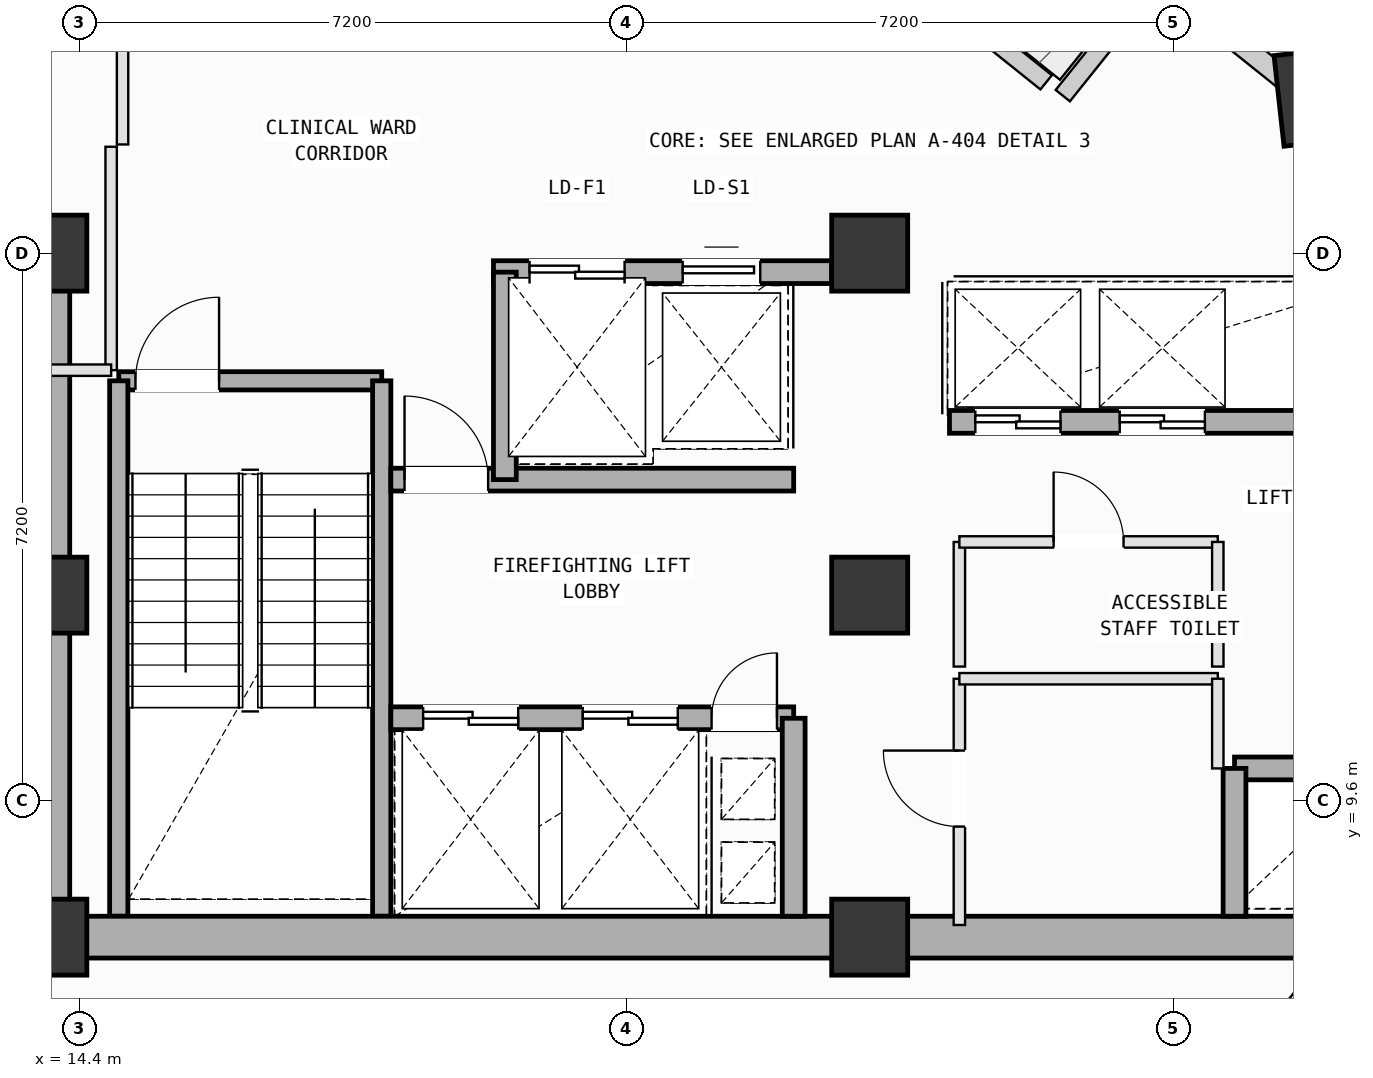
"""IFC4 building model, lengths in metres.
Left out: names, types, materials, properties, quantities, classifications, styles, units other than length and angle.
Written with IfcOpenShell. Run it as: python <this file> out.ifc"""

import sys

from ifc_helpers import new_model, si_unit, direction, frame, frame_2d, origin, origin_2d, place, context, subcontext, project, spatial, rectangle, extrude, element, fill, save


model = new_model("IFC4")
c1 = context("Model", 3, precision=1e-05, world=origin(), true_north=direction((0.0, 1.0)))
c2 = subcontext(c1, "Body", "Model", "MODEL_VIEW")
j1 = project(units=[si_unit("LENGTHUNIT", "METRE"), si_unit("PLANEANGLEUNIT", "RADIAN")], contexts=[c1])
p1 = place(None, origin())
s1 = spatial("IfcSite", under=j1, at=p1, CompositionType="ELEMENT")
p2 = place(p1, origin())
s2 = spatial("IfcBuilding", under=s1, at=p2, CompositionType="ELEMENT")
p3 = place(p2, frame((0.0, 0.0, 243.2)))
s3 = spatial("IfcBuildingStorey", under=s2, at=p3, CompositionType="ELEMENT", Elevation=243.2)
for number, where, z_axis, x_axis in (
    (1, (14.0, 7.8, 0.0), (0.0, 0.0, 1.0), (1.0, 0.0, 0.0)),
    (2, (14.0, 12.3, 0.0), (0.0, 0.0, 1.0), (1.0, 0.0, 0.0)),
    (3, (14.0, 16.8, 0.0), (0.0, 0.0, 1.0), (1.0, 0.0, 0.0)),
    (4, (24.8, 7.8, 0.0), (0.0, 0.0, 1.0), (1.0, 0.0, 0.0)),
    (5, (24.8, 12.3, 0.0), (0.0, 0.0, 1.0), (1.0, 0.0, 0.0)),
    (6, (24.8, 16.8, 0.0), (0.0, 0.0, 1.0), (1.0, 0.0, 0.0)),
):
    element("IfcColumn", number, at=place(p3, frame(where, z_axis=z_axis, x_axis=x_axis)), inside=s3, PredefinedType="COLUMN", context=c2, shape_type="SweptSolid", body=[
        extrude(rectangle(XDim=1.0, YDim=1.0, at=origin_2d()), origin(), (0.0, 0.0, 1.0), 4.0),
    ])
p4 = place(p3, frame((30.558, 18.844, 0.002), z_axis=(0.024793450183, -0.012396725092, 0.999615729185), x_axis=(-0.937758754532, 0.346192687734, 0.027552518172)))
e7 = element("IfcColumn", 7, at=p4, inside=s3, PredefinedType="COLUMN", context=c2, shape_type="SweptSolid", body=[
    extrude(rectangle(XDim=1.2, YDim=0.75, at=origin_2d()), origin(), (0.0, 0.0, 1.0), 3.998),
])
p5 = place(p3, frame((21.69, 23.399, 0.0), z_axis=(0.0, 0.0, 1.0), x_axis=(0.780444274377, -0.625225347049, 0.0)))
e8 = element("IfcWall", 8, at=p5, inside=s3, PredefinedType="SOLIDWALL", context=c2, shape_type="SweptSolid", body=[
    extrude(rectangle(XDim=6.96, YDim=0.24, at=frame_2d((3.48, 0.0))), origin(), (0.0, 0.0, 1.0), 3.265),
])
p6 = place(p5, frame((3.597, 0.0, 0.0)))
e9 = element("IfcOpeningElement", 9, at=p6, cuts=e8, PredefinedType="OPENING", context=c2, shape_type="SweptSolid", body=[
    extrude(rectangle(XDim=1.1, YDim=2.15, at=frame_2d((0.55, 1.075))), frame((0.0, 0.13, 0.0), z_axis=(0.0, -1.0, 0.0), x_axis=(1.0, 0.0, 0.0)), (0.0, 0.0, 1.0), 0.26),
])
p7 = place(p3, frame((27.34, 18.872, 0.0), z_axis=(0.0, 0.0, 1.0), x_axis=(0.625195109781, 0.780468496934, 0.0)))
e10 = element("IfcWall", 10, at=p7, inside=s3, PredefinedType="SOLIDWALL", context=c2, shape_type="SweptSolid", body=[
    extrude(rectangle(XDim=2.5, YDim=0.24, at=frame_2d((1.25, 0.0))), origin(), (0.0, 0.0, 1.0), 3.265),
])
p8 = place(p3, frame((28.6, 20.413, 0.0), z_axis=(0.0, 0.0, 1.0), x_axis=(0.78039569027, -0.625285987856, 0.0)))
e11 = element("IfcWall", 11, at=p8, inside=s3, PredefinedType="SOLIDWALL", context=c2, shape_type="SweptSolid", body=[
    extrude(rectangle(XDim=2.166, YDim=0.28, at=frame_2d((1.083, 0.0))), origin(), (0.0, 0.0, 1.0), 3.165),
])
p9 = place(p3, frame((14.783, 4.702, 0.0), z_axis=(0.0, 0.0, 1.0), x_axis=(-0.780421571558, 0.625253685033, 0.0)))
e12 = element("IfcWall", 12, at=p9, inside=s3, PredefinedType="SOLIDWALL", context=c2, shape_type="SweptSolid", body=[
    extrude(rectangle(XDim=5.861, YDim=0.28, at=frame_2d((2.93, 0.0))), origin(), (0.0, 0.0, 1.0), 3.265),
])
p10 = place(p9, frame((1.173, 0.0, 0.75)))
e13 = element("IfcOpeningElement", 13, at=p10, cuts=e12, PredefinedType="OPENING", context=c2, shape_type="SweptSolid", body=[
    extrude(rectangle(XDim=1.4, YDim=1.85, at=frame_2d((0.7, 0.925))), frame((0.0, 0.15, 0.0), z_axis=(0.0, -1.0, 0.0), x_axis=(1.0, 0.0, 0.0)), (0.0, 0.0, 1.0), 0.3),
])
p11 = place(p3, frame((14.92, 15.12, 0.0), z_axis=(0.0, 0.0, 1.0), x_axis=(1.0, 0.0, 0.0)))
e14 = element("IfcWall", 14, at=p11, inside=s3, PredefinedType="SOLIDWALL", context=c2, shape_type="SweptSolid", body=[
    extrude(rectangle(XDim=3.46, YDim=0.24, at=frame_2d((1.73, 0.0))), origin(), (0.0, 0.0, 1.0), 3.78),
])
p12 = place(p11, frame((0.22, 0.0, 0.0)))
e15 = element("IfcOpeningElement", 15, at=p12, cuts=e14, PredefinedType="OPENING", context=c2, shape_type="SweptSolid", body=[
    extrude(rectangle(XDim=1.1, YDim=2.15, at=frame_2d((0.55, 1.075))), frame((0.0, 0.13, 0.0), z_axis=(0.0, -1.0, 0.0), x_axis=(1.0, 0.0, 0.0)), (0.0, 0.0, 1.0), 0.26),
])
for number, where, z_axis, x_axis in (
    (16, (18.38, 15.12, 0.0), (0.0, 0.0, 1.0), (0.0, -1.0, 0.0)),
    (17, (14.92, 8.075, 0.0), (0.0, 0.0, 1.0), (0.0, 1.0, 0.0)),
):
    element("IfcWall", number, at=place(p3, frame(where, z_axis=z_axis, x_axis=x_axis)), inside=s3, PredefinedType="SOLIDWALL", context=c2, shape_type="SweptSolid", body=[
        extrude(rectangle(XDim=7.045, YDim=0.24, at=frame_2d((3.522, 0.0))), origin(), (0.0, 0.0, 1.0), 3.78),
    ])
for number, where, z_axis, x_axis in (
    (18, (14.0, 7.8, 0.0), (0.0, 0.0, 1.0), (1.0, 0.0, 0.0)),
    (19, (24.8, 7.8, 0.0), (0.0, 0.0, 1.0), (1.0, 0.0, 0.0)),
):
    element("IfcWall", number, at=place(p3, frame(where, z_axis=z_axis, x_axis=x_axis)), inside=s3, PredefinedType="SHEAR", context=c2, shape_type="SweptSolid", body=[
        extrude(rectangle(XDim=10.8, YDim=0.55, at=frame_2d((5.4, 0.0))), origin(), (0.0, 0.0, 1.0), 3.78),
    ])
p13 = place(p3, frame((14.0, 16.8, 0.0), z_axis=(0.0, 0.0, 1.0), x_axis=(0.0, -1.0, 0.0)))
e20 = element("IfcWall", 20, at=p13, inside=s3, PredefinedType="SHEAR", context=c2, shape_type="SweptSolid", body=[
    extrude(rectangle(XDim=9.0, YDim=0.55, at=frame_2d((4.5, 0.0))), origin(), (0.0, 0.0, 1.0), 3.78),
])
p14 = place(p3, frame((19.85, 16.55, 0.0), z_axis=(0.0, 0.0, 1.0), x_axis=(1.0, 0.0, 0.0)))
e21 = element("IfcWall", 21, at=p14, inside=s3, PredefinedType="SOLIDWALL", context=c2, shape_type="SweptSolid", body=[
    extrude(rectangle(XDim=4.45, YDim=0.3, at=frame_2d((2.225, 0.0))), origin(), (0.0, 0.0, 1.0), 3.78),
])
p15 = place(p14, frame((0.475, 0.0, 0.0)))
e22 = element("IfcOpeningElement", 22, at=p15, cuts=e21, PredefinedType="OPENING", context=c2, shape_type="SweptSolid", body=[
    extrude(rectangle(XDim=1.25, YDim=2.18, at=frame_2d((0.625, 1.09))), frame((0.0, 0.16, 0.0), z_axis=(0.0, -1.0, 0.0), x_axis=(1.0, 0.0, 0.0)), (0.0, 0.0, 1.0), 0.32),
])
p16 = place(p14, frame((2.49, 0.0, 0.0)))
e23 = element("IfcOpeningElement", 23, at=p16, cuts=e21, PredefinedType="OPENING", context=c2, shape_type="SweptSolid", body=[
    extrude(rectangle(XDim=1.02, YDim=2.12, at=frame_2d((0.51, 1.06))), frame((0.0, 0.16, 0.0), z_axis=(0.0, -1.0, 0.0), x_axis=(1.0, 0.0, 0.0)), (0.0, 0.0, 1.0), 0.32),
])
p17 = place(p3, frame((18.5, 10.68, 0.0), z_axis=(0.0, 0.0, 1.0), x_axis=(1.0, 0.0, 0.0)))
e24 = element("IfcWall", 24, at=p17, inside=s3, PredefinedType="SOLIDWALL", context=c2, shape_type="SweptSolid", body=[
    extrude(rectangle(XDim=5.3, YDim=0.3, at=frame_2d((2.65, 0.0))), origin(), (0.0, 0.0, 1.0), 3.78),
])
p18 = place(p17, frame((4.22, 0.0, 0.0)))
e25 = element("IfcOpeningElement", 25, at=p18, cuts=e24, PredefinedType="OPENING", context=c2, shape_type="SweptSolid", body=[
    extrude(rectangle(XDim=0.86, YDim=2.06, at=frame_2d((0.43, 1.03))), frame((0.0, 0.16, 0.0), z_axis=(0.0, -1.0, 0.0), x_axis=(1.0, 0.0, 0.0)), (0.0, 0.0, 1.0), 0.32),
])
p19 = place(p17, frame((0.425, 0.0, 0.0)))
e26 = element("IfcOpeningElement", 26, at=p19, cuts=e24, PredefinedType="OPENING", context=c2, shape_type="SweptSolid", body=[
    extrude(rectangle(XDim=1.25, YDim=2.18, at=frame_2d((0.625, 1.09))), frame((0.0, 0.16, 0.0), z_axis=(0.0, -1.0, 0.0), x_axis=(1.0, 0.0, 0.0)), (0.0, 0.0, 1.0), 0.32),
])
p20 = place(p17, frame((2.525, 0.0, 0.0)))
e27 = element("IfcOpeningElement", 27, at=p20, cuts=e24, PredefinedType="OPENING", context=c2, shape_type="SweptSolid", body=[
    extrude(rectangle(XDim=1.25, YDim=2.18, at=frame_2d((0.625, 1.09))), frame((0.0, 0.16, 0.0), z_axis=(0.0, -1.0, 0.0), x_axis=(1.0, 0.0, 0.0)), (0.0, 0.0, 1.0), 0.32),
])
p21 = place(p3, frame((18.5, 13.82, 0.0), z_axis=(0.0, 0.0, 1.0), x_axis=(1.0, 0.0, 0.0)))
e28 = element("IfcWall", 28, at=p21, inside=s3, PredefinedType="SOLIDWALL", context=c2, shape_type="SweptSolid", body=[
    extrude(rectangle(XDim=5.3, YDim=0.3, at=frame_2d((2.65, 0.0))), origin(), (0.0, 0.0, 1.0), 3.78),
])
p22 = place(p21, frame((0.18, 0.0, 0.0)))
e29 = element("IfcOpeningElement", 29, at=p22, cuts=e28, PredefinedType="OPENING", context=c2, shape_type="SweptSolid", body=[
    extrude(rectangle(XDim=1.1, YDim=2.15, at=frame_2d((0.55, 1.075))), frame((0.0, 0.16, 0.0), z_axis=(0.0, -1.0, 0.0), x_axis=(1.0, 0.0, 0.0)), (0.0, 0.0, 1.0), 0.32),
])
p23 = place(p3, frame((23.8, 8.075, 0.0), z_axis=(0.0, 0.0, 1.0), x_axis=(0.0, 1.0, 0.0)))
e30 = element("IfcWall", 30, at=p23, inside=s3, PredefinedType="SOLIDWALL", context=c2, shape_type="SweptSolid", body=[
    extrude(rectangle(XDim=2.605, YDim=0.3, at=frame_2d((1.302, 0.0))), origin(), (0.0, 0.0, 1.0), 3.78),
])
p24 = place(p3, frame((20.0, 13.82, 0.0), z_axis=(0.0, 0.0, 1.0), x_axis=(0.0, 1.0, 0.0)))
e31 = element("IfcWall", 31, at=p24, inside=s3, PredefinedType="SOLIDWALL", context=c2, shape_type="SweptSolid", body=[
    extrude(rectangle(XDim=2.73, YDim=0.3, at=frame_2d((1.365, 0.0))), origin(), (0.0, 0.0, 1.0), 3.78),
])
p25 = place(p3, frame((29.6, 10.02, 0.0), z_axis=(0.0, 0.0, 1.0), x_axis=(1.0, 0.0, 0.0)))
e32 = element("IfcWall", 32, at=p25, inside=s3, PredefinedType="SOLIDWALL", context=c2, shape_type="SweptSolid", body=[
    extrude(rectangle(XDim=1.7, YDim=0.3, at=frame_2d((0.85, 0.0))), origin(), (0.0, 0.0, 1.0), 3.78),
])
p26 = place(p3, frame((29.6, 8.075, 0.0), z_axis=(0.0, 0.0, 1.0), x_axis=(0.0, 1.0, 0.0)))
e33 = element("IfcWall", 33, at=p26, inside=s3, PredefinedType="SOLIDWALL", context=c2, shape_type="SweptSolid", body=[
    extrude(rectangle(XDim=1.945, YDim=0.3, at=frame_2d((0.973, 0.0))), origin(), (0.0, 0.0, 1.0), 3.78),
])
p27 = place(p3, frame((25.85, 14.58, 0.0), z_axis=(0.0, 0.0, 1.0), x_axis=(1.0, 0.0, 0.0)))
e34 = element("IfcWall", 34, at=p27, inside=s3, PredefinedType="SOLIDWALL", context=c2, shape_type="SweptSolid", body=[
    extrude(rectangle(XDim=5.45, YDim=0.3, at=frame_2d((2.725, 0.0))), origin(), (0.0, 0.0, 1.0), 3.78),
])
p28 = place(p27, frame((0.34, 0.0, 0.0)))
e35 = element("IfcOpeningElement", 35, at=p28, cuts=e34, PredefinedType="OPENING", context=c2, shape_type="SweptSolid", body=[
    extrude(rectangle(XDim=1.12, YDim=2.15, at=frame_2d((0.56, 1.075))), frame((0.0, 0.16, 0.0), z_axis=(0.0, -1.0, 0.0), x_axis=(1.0, 0.0, 0.0)), (0.0, 0.0, 1.0), 0.32),
])
p29 = place(p27, frame((2.24, 0.0, 0.0)))
e36 = element("IfcOpeningElement", 36, at=p29, cuts=e34, PredefinedType="OPENING", context=c2, shape_type="SweptSolid", body=[
    extrude(rectangle(XDim=1.12, YDim=2.15, at=frame_2d((0.56, 1.075))), frame((0.0, 0.16, 0.0), z_axis=(0.0, -1.0, 0.0), x_axis=(1.0, 0.0, 0.0)), (0.0, 0.0, 1.0), 0.32),
])
p30 = place(p3, frame((25.98, 7.96, 0.0), z_axis=(0.0, 0.0, 1.0), x_axis=(0.0, 1.0, 0.0)))
e37 = element("IfcWall", 37, at=p30, inside=s3, PredefinedType="PARTITIONING", context=c2, shape_type="SweptSolid", body=[
    extrude(rectangle(XDim=3.24, YDim=0.15, at=frame_2d((1.62, 0.0))), origin(), (0.0, 0.0, 1.0), 3.78),
])
p31 = place(p30, frame((1.295, 0.0, 0.0)))
e38 = element("IfcOpeningElement", 38, at=p31, cuts=e37, PredefinedType="OPENING", context=c2, shape_type="SweptSolid", body=[
    extrude(rectangle(XDim=1.0, YDim=2.12, at=frame_2d((0.5, 1.06))), frame((0.0, 0.085, 0.0), z_axis=(0.0, -1.0, 0.0), x_axis=(1.0, 0.0, 0.0)), (0.0, 0.0, 1.0), 0.17),
])
p32 = place(p3, frame((25.98, 11.2, 0.0), z_axis=(0.0, 0.0, 1.0), x_axis=(1.0, 0.0, 0.0)))
e39 = element("IfcWall", 39, at=p32, inside=s3, PredefinedType="PARTITIONING", context=c2, shape_type="SweptSolid", body=[
    extrude(rectangle(XDim=3.4, YDim=0.15, at=frame_2d((1.7, 0.0))), origin(), (0.0, 0.0, 1.0), 3.78),
])
p33 = place(p3, frame((29.38, 11.2, 0.0), z_axis=(0.0, 0.0, 1.0), x_axis=(0.0, -1.0, 0.0)))
e40 = element("IfcWall", 40, at=p33, inside=s3, PredefinedType="PARTITIONING", context=c2, shape_type="SweptSolid", body=[
    extrude(rectangle(XDim=1.18, YDim=0.15, at=frame_2d((0.59, 0.0))), origin(), (0.0, 0.0, 1.0), 3.78),
])
p34 = place(p3, frame((25.98, 11.36, 0.0), z_axis=(0.0, 0.0, 1.0), x_axis=(0.0, 1.0, 0.0)))
e41 = element("IfcWall", 41, at=p34, inside=s3, PredefinedType="PARTITIONING", context=c2, shape_type="SweptSolid", body=[
    extrude(rectangle(XDim=1.64, YDim=0.15, at=frame_2d((0.82, 0.0))), origin(), (0.0, 0.0, 1.0), 3.78),
])
p35 = place(p3, frame((25.98, 13.0, 0.0), z_axis=(0.0, 0.0, 1.0), x_axis=(1.0, 0.0, 0.0)))
e42 = element("IfcWall", 42, at=p35, inside=s3, PredefinedType="PARTITIONING", context=c2, shape_type="SweptSolid", body=[
    extrude(rectangle(XDim=3.4, YDim=0.15, at=frame_2d((1.7, 0.0))), origin(), (0.0, 0.0, 1.0), 3.78),
])
p36 = place(p35, frame((1.24, 0.0, 0.0)))
e43 = element("IfcOpeningElement", 43, at=p36, cuts=e42, PredefinedType="OPENING", context=c2, shape_type="SweptSolid", body=[
    extrude(rectangle(XDim=0.92, YDim=2.1, at=frame_2d((0.46, 1.05))), frame((0.0, 0.085, 0.0), z_axis=(0.0, -1.0, 0.0), x_axis=(1.0, 0.0, 0.0)), (0.0, 0.0, 1.0), 0.17),
])
p37 = place(p3, frame((29.38, 13.0, 0.0), z_axis=(0.0, 0.0, 1.0), x_axis=(0.0, -1.0, 0.0)))
e44 = element("IfcWall", 44, at=p37, inside=s3, PredefinedType="PARTITIONING", context=c2, shape_type="SweptSolid", body=[
    extrude(rectangle(XDim=1.64, YDim=0.15, at=frame_2d((0.82, 0.0))), origin(), (0.0, 0.0, 1.0), 3.78),
])
p38 = place(p3, frame((23.26, -1.941, 0.0), z_axis=(0.0, 0.0, 1.0), x_axis=(0.625255482182, 0.780420131725, 0.0)))
e45 = element("IfcWall", 45, at=p38, inside=s3, PredefinedType="PARTITIONING", context=c2, shape_type="SweptSolid", body=[
    extrude(rectangle(XDim=12.322, YDim=0.15, at=frame_2d((6.161, 0.0))), origin(), (0.0, 0.0, 1.0), 3.78),
])
p39 = place(p3, frame((14.97, 20.55, 0.0), z_axis=(0.0, 0.0, 1.0), x_axis=(0.0, -1.0, 0.0)))
e46 = element("IfcWall", 46, at=p39, inside=s3, PredefinedType="PARTITIONING", context=c2, shape_type="SweptSolid", body=[
    extrude(rectangle(XDim=2.32, YDim=0.15, at=frame_2d((1.16, 0.0))), origin(), (0.0, 0.0, 1.0), 3.78),
])
p40 = place(p3, frame((14.82, 18.2, 0.0), z_axis=(0.0, 0.0, 1.0), x_axis=(0.0, -1.0, 0.0)))
e47 = element("IfcWall", 47, at=p40, inside=s3, PredefinedType="PARTITIONING", context=c2, shape_type="SweptSolid", body=[
    extrude(rectangle(XDim=2.94, YDim=0.15, at=frame_2d((1.47, 0.0))), origin(), (0.0, 0.0, 1.0), 3.78),
])
p41 = place(p3, frame((14.82, 15.26, 0.0), z_axis=(0.0, 0.0, 1.0), x_axis=(-1.0, 0.0, 0.0)))
e48 = element("IfcWall", 48, at=p41, inside=s3, PredefinedType="PARTITIONING", context=c2, shape_type="SweptSolid", body=[
    extrude(rectangle(XDim=1.12, YDim=0.15, at=frame_2d((0.56, 0.0))), origin(), (0.0, 0.0, 1.0), 3.78),
])
p42 = place(p12, origin())
e49 = element("IfcDoor", 49, at=p42, inside=s3, OperationType="SINGLE_SWING_RIGHT", PredefinedType="DOOR", context=c2, shape_type="SweptSolid", body=[
    extrude(rectangle(XDim=1.1, YDim=2.15, at=frame_2d((0.55, 1.075))), frame((0.0, 0.025, 0.0), z_axis=(0.0, -1.0, 0.0), x_axis=(1.0, 0.0, 0.0)), (0.0, 0.0, 1.0), 0.05),
])
fill(e15, e49)
p43 = place(p18, origin())
e50 = element("IfcDoor", 50, at=p43, inside=s3, OperationType="SINGLE_SWING_RIGHT", PredefinedType="DOOR", context=c2, shape_type="SweptSolid", body=[
    extrude(rectangle(XDim=0.86, YDim=2.06, at=frame_2d((0.43, 1.03))), frame((0.0, 0.025, 0.0), z_axis=(0.0, -1.0, 0.0), x_axis=(1.0, 0.0, 0.0)), (0.0, 0.0, 1.0), 0.05),
])
fill(e25, e50)
p44 = place(p22, origin())
e51 = element("IfcDoor", 51, at=p44, inside=s3, OperationType="SINGLE_SWING_LEFT", PredefinedType="DOOR", context=c2, shape_type="SweptSolid", body=[
    extrude(rectangle(XDim=1.1, YDim=2.15, at=frame_2d((0.55, 1.075))), frame((0.0, 0.025, 0.0), z_axis=(0.0, -1.0, 0.0), x_axis=(1.0, 0.0, 0.0)), (0.0, 0.0, 1.0), 0.05),
])
fill(e29, e51)
p45 = place(p19, origin())
e52 = element("IfcDoor", 52, at=p45, inside=s3, OperationType="DOUBLE_DOOR_SLIDING", PredefinedType="DOOR", context=c2, shape_type="SweptSolid", body=[
    extrude(rectangle(XDim=1.25, YDim=2.18, at=frame_2d((0.625, 1.09))), frame((0.0, 0.025, 0.0), z_axis=(0.0, -1.0, 0.0), x_axis=(1.0, 0.0, 0.0)), (0.0, 0.0, 1.0), 0.05),
])
fill(e26, e52)
p46 = place(p20, origin())
e53 = element("IfcDoor", 53, at=p46, inside=s3, OperationType="DOUBLE_DOOR_SLIDING", PredefinedType="DOOR", context=c2, shape_type="SweptSolid", body=[
    extrude(rectangle(XDim=1.25, YDim=2.18, at=frame_2d((0.625, 1.09))), frame((0.0, 0.025, 0.0), z_axis=(0.0, -1.0, 0.0), x_axis=(1.0, 0.0, 0.0)), (0.0, 0.0, 1.0), 0.05),
])
fill(e27, e53)
p47 = place(p28, origin())
e54 = element("IfcDoor", 54, at=p47, inside=s3, OperationType="DOUBLE_DOOR_SLIDING", PredefinedType="DOOR", context=c2, shape_type="SweptSolid", body=[
    extrude(rectangle(XDim=1.12, YDim=2.15, at=frame_2d((0.56, 1.075))), frame((0.0, 0.025, 0.0), z_axis=(0.0, -1.0, 0.0), x_axis=(1.0, 0.0, 0.0)), (0.0, 0.0, 1.0), 0.05),
])
fill(e35, e54)
p48 = place(p29, origin())
e55 = element("IfcDoor", 55, at=p48, inside=s3, OperationType="DOUBLE_DOOR_SLIDING", PredefinedType="DOOR", context=c2, shape_type="SweptSolid", body=[
    extrude(rectangle(XDim=1.12, YDim=2.15, at=frame_2d((0.56, 1.075))), frame((0.0, 0.025, 0.0), z_axis=(0.0, -1.0, 0.0), x_axis=(1.0, 0.0, 0.0)), (0.0, 0.0, 1.0), 0.05),
])
fill(e36, e55)
p49 = place(p15, origin())
e56 = element("IfcDoor", 56, at=p49, inside=s3, OperationType="DOUBLE_DOOR_SLIDING", PredefinedType="DOOR", context=c2, shape_type="SweptSolid", body=[
    extrude(rectangle(XDim=1.25, YDim=2.18, at=frame_2d((0.625, 1.09))), frame((0.0, 0.025, 0.0), z_axis=(0.0, -1.0, 0.0), x_axis=(1.0, 0.0, 0.0)), (0.0, 0.0, 1.0), 0.05),
])
fill(e22, e56)
p50 = place(p16, origin())
e57 = element("IfcDoor", 57, at=p50, inside=s3, OperationType="SLIDING_TO_LEFT", PredefinedType="DOOR", context=c2, shape_type="SweptSolid", body=[
    extrude(rectangle(XDim=1.02, YDim=2.12, at=frame_2d((0.51, 1.06))), frame((0.0, 0.025, 0.0), z_axis=(0.0, -1.0, 0.0), x_axis=(1.0, 0.0, 0.0)), (0.0, 0.0, 1.0), 0.05),
])
fill(e23, e57)
p51 = place(p31, origin())
e58 = element("IfcDoor", 58, at=p51, inside=s3, OperationType="SINGLE_SWING_RIGHT", PredefinedType="DOOR", context=c2, shape_type="SweptSolid", body=[
    extrude(rectangle(XDim=1.0, YDim=2.12, at=frame_2d((0.5, 1.06))), frame((0.0, 0.025, 0.0), z_axis=(0.0, -1.0, 0.0), x_axis=(1.0, 0.0, 0.0)), (0.0, 0.0, 1.0), 0.05),
])
fill(e38, e58)
p52 = place(p36, origin())
e59 = element("IfcDoor", 59, at=p52, inside=s3, OperationType="SINGLE_SWING_LEFT", PredefinedType="DOOR", context=c2, shape_type="SweptSolid", body=[
    extrude(rectangle(XDim=0.92, YDim=2.1, at=frame_2d((0.46, 1.05))), frame((0.0, 0.025, 0.0), z_axis=(0.0, -1.0, 0.0), x_axis=(1.0, 0.0, 0.0)), (0.0, 0.0, 1.0), 0.05),
])
fill(e43, e59)
save(model, sys.argv[1])
